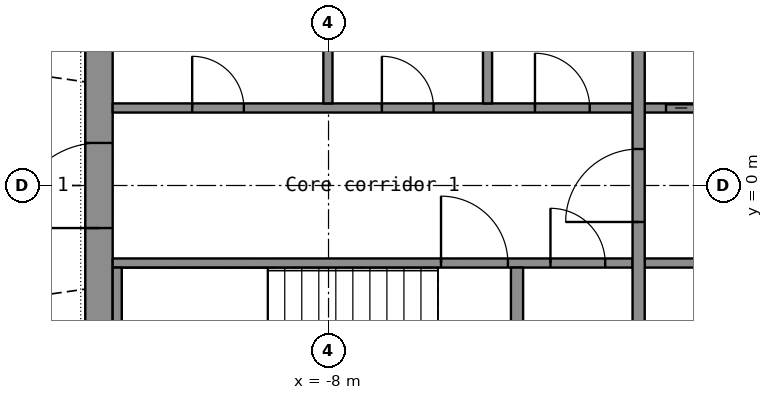
"""IFC4 building model, lengths in metres.
Left out: names, types, materials, properties, quantities, classifications, styles, units other than length and angle.
Written with IfcOpenShell. Run it as: python <this file> out.ifc"""

import sys

from ifc_helpers import new_model, si_unit, direction, frame, frame_2d, origin, place, context, subcontext, project, spatial, rectangle, extrude, element, fill, save


model = new_model("IFC4")
c1 = context("Model", 3, precision=1e-05, world=origin(), true_north=direction((0.0, 1.0)))
c2 = subcontext(c1, "Body", "Model", "MODEL_VIEW")
j1 = project(units=[si_unit("LENGTHUNIT", "METRE"), si_unit("PLANEANGLEUNIT", "RADIAN")], contexts=[c1])
p1 = place(None, origin())
s1 = spatial("IfcSite", under=j1, at=p1, CompositionType="ELEMENT")
p2 = place(p1, origin())
s2 = spatial("IfcBuilding", under=s1, at=p2, CompositionType="ELEMENT")
p3 = place(p2, frame((0.0, 0.0, 160.8)))
s3 = spatial("IfcBuildingStorey", under=s2, at=p3, CompositionType="ELEMENT", Elevation=160.8)
p4 = place(p3, frame((-11.775, -7.2, 0.0), z_axis=(0.0, 0.0, 1.0), x_axis=(0.0, 1.0, 0.0)))
e1 = element("IfcWall", 1, at=p4, inside=s3, PredefinedType="SHEAR", context=c2, shape_type="SweptSolid", body=[
    extrude(rectangle(XDim=14.4, YDim=0.45, at=frame_2d((7.2, 0.0))), origin(), (0.0, 0.0, 1.0), 3.3),
])
p5 = place(p4, frame((6.5, 0.0, 0.0)))
e2 = element("IfcOpeningElement", 2, at=p5, cuts=e1, PredefinedType="OPENING", context=c2, shape_type="SweptSolid", body=[
    extrude(rectangle(XDim=1.4, YDim=2.2, at=frame_2d((0.7, 1.1))), frame((0.0, 0.235, 0.0), z_axis=(0.0, -1.0, 0.0), x_axis=(1.0, 0.0, 0.0)), (0.0, 0.0, 1.0), 0.47),
])
p6 = place(p3, frame((-11.55, -1.275, 0.0), z_axis=(0.0, 0.0, 1.0), x_axis=(1.0, 0.0, 0.0)))
e3 = element("IfcWall", 3, at=p6, inside=s3, PredefinedType="SHEAR", context=c2, shape_type="SweptSolid", body=[
    extrude(rectangle(XDim=8.55, YDim=0.15, at=frame_2d((4.275, 0.0))), origin(), (0.0, 0.0, 1.0), 3.3),
])
p7 = place(p6, frame((5.4, 0.0, 0.0)))
e4 = element("IfcOpeningElement", 4, at=p7, cuts=e3, PredefinedType="OPENING", context=c2, shape_type="SweptSolid", body=[
    extrude(rectangle(XDim=1.1, YDim=2.15, at=frame_2d((0.55, 1.075))), frame((0.0, 0.085, 0.0), z_axis=(0.0, -1.0, 0.0), x_axis=(1.0, 0.0, 0.0)), (0.0, 0.0, 1.0), 0.17),
])
p8 = place(p6, frame((7.2, 0.0, 0.0)))
e5 = element("IfcOpeningElement", 5, at=p8, cuts=e3, PredefinedType="OPENING", context=c2, shape_type="SweptSolid", body=[
    extrude(rectangle(XDim=0.9, YDim=2.1, at=frame_2d((0.45, 1.05))), frame((0.0, 0.085, 0.0), z_axis=(0.0, -1.0, 0.0), x_axis=(1.0, 0.0, 0.0)), (0.0, 0.0, 1.0), 0.17),
])
p9 = place(p3, frame((-2.8, -1.275, 0.0), z_axis=(0.0, 0.0, 1.0), x_axis=(1.0, 0.0, 0.0)))
e6 = element("IfcWall", 6, at=p9, inside=s3, PredefinedType="SHEAR", context=c2, shape_type="SweptSolid", body=[
    extrude(rectangle(XDim=5.6, YDim=0.15, at=frame_2d((2.8, 0.0))), origin(), (0.0, 0.0, 1.0), 3.3),
])
p10 = place(p9, frame((4.15, 0.0, 0.0)))
e7 = element("IfcOpeningElement", 7, at=p10, cuts=e6, PredefinedType="OPENING", context=c2, shape_type="SweptSolid", body=[
    extrude(rectangle(XDim=1.1, YDim=2.2, at=frame_2d((0.55, 1.1))), frame((0.0, 0.085, 0.0), z_axis=(0.0, -1.0, 0.0), x_axis=(1.0, 0.0, 0.0)), (0.0, 0.0, 1.0), 0.17),
])
p11 = place(p9, frame((1.35, 0.0, 0.0)))
e8 = element("IfcOpeningElement", 8, at=p11, cuts=e6, PredefinedType="OPENING", context=c2, shape_type="SweptSolid", body=[
    extrude(rectangle(XDim=0.9, YDim=2.1, at=frame_2d((0.45, 1.05))), frame((0.0, 0.085, 0.0), z_axis=(0.0, -1.0, 0.0), x_axis=(1.0, 0.0, 0.0)), (0.0, 0.0, 1.0), 0.17),
])
p12 = place(p3, frame((-11.55, 1.275, 0.0), z_axis=(0.0, 0.0, 1.0), x_axis=(1.0, 0.0, 0.0)))
e9 = element("IfcWall", 9, at=p12, inside=s3, PredefinedType="PARTITIONING", context=c2, shape_type="SweptSolid", body=[
    extrude(rectangle(XDim=8.55, YDim=0.15, at=frame_2d((4.275, 0.0))), origin(), (0.0, 0.0, 1.0), 3.3),
])
p13 = place(p12, frame((1.308, 0.0, 0.0)))
e10 = element("IfcOpeningElement", 10, at=p13, cuts=e9, PredefinedType="OPENING", context=c2, shape_type="SweptSolid", body=[
    extrude(rectangle(XDim=0.85, YDim=2.1, at=frame_2d((0.425, 1.05))), frame((0.0, 0.085, 0.0), z_axis=(0.0, -1.0, 0.0), x_axis=(1.0, 0.0, 0.0)), (0.0, 0.0, 1.0), 0.17),
])
p14 = place(p12, frame((4.427, 0.0, 0.0)))
e11 = element("IfcOpeningElement", 11, at=p14, cuts=e9, PredefinedType="OPENING", context=c2, shape_type="SweptSolid", body=[
    extrude(rectangle(XDim=0.85, YDim=2.1, at=frame_2d((0.425, 1.05))), frame((0.0, 0.085, 0.0), z_axis=(0.0, -1.0, 0.0), x_axis=(1.0, 0.0, 0.0)), (0.0, 0.0, 1.0), 0.17),
])
p15 = place(p12, frame((6.945, 0.0, 0.0)))
e12 = element("IfcOpeningElement", 12, at=p15, cuts=e9, PredefinedType="OPENING", context=c2, shape_type="SweptSolid", body=[
    extrude(rectangle(XDim=0.9, YDim=2.1, at=frame_2d((0.45, 1.05))), frame((0.0, 0.085, 0.0), z_axis=(0.0, -1.0, 0.0), x_axis=(1.0, 0.0, 0.0)), (0.0, 0.0, 1.0), 0.17),
])
p16 = place(p3, frame((-2.8, 1.275, 0.0), z_axis=(0.0, 0.0, 1.0), x_axis=(1.0, 0.0, 0.0)))
e13 = element("IfcWall", 13, at=p16, inside=s3, PredefinedType="SHEAR", context=c2, shape_type="SweptSolid", body=[
    extrude(rectangle(XDim=5.6, YDim=0.15, at=frame_2d((2.8, 0.0))), origin(), (0.0, 0.0, 1.0), 3.3),
])
p17 = place(p16, frame((0.35, 0.0, 0.0)))
e14 = element("IfcOpeningElement", 14, at=p17, cuts=e13, PredefinedType="OPENING", context=c2, shape_type="SweptSolid", body=[
    extrude(rectangle(XDim=1.1, YDim=2.2, at=frame_2d((0.55, 1.1))), frame((0.0, 0.085, 0.0), z_axis=(0.0, -1.0, 0.0), x_axis=(1.0, 0.0, 0.0)), (0.0, 0.0, 1.0), 0.17),
])
p18 = place(p16, frame((3.35, 0.0, 0.0)))
e15 = element("IfcOpeningElement", 15, at=p18, cuts=e13, PredefinedType="OPENING", context=c2, shape_type="SweptSolid", body=[
    extrude(rectangle(XDim=0.9, YDim=2.1, at=frame_2d((0.45, 1.05))), frame((0.0, 0.085, 0.0), z_axis=(0.0, -1.0, 0.0), x_axis=(1.0, 0.0, 0.0)), (0.0, 0.0, 1.0), 0.17),
])
p19 = place(p3, frame((-2.9, -3.7, 0.0), z_axis=(0.0, 0.0, 1.0), x_axis=(0.0, 1.0, 0.0)))
e16 = element("IfcWall", 16, at=p19, inside=s3, PredefinedType="SHEAR", context=c2, shape_type="SweptSolid", body=[
    extrude(rectangle(XDim=7.4, YDim=0.2, at=frame_2d((3.7, 0.0))), origin(), (0.0, 0.0, 1.0), 3.3),
])
p20 = place(p19, frame((3.1, 0.0, 0.0)))
e17 = element("IfcOpeningElement", 17, at=p20, cuts=e16, PredefinedType="OPENING", context=c2, shape_type="SweptSolid", body=[
    extrude(rectangle(XDim=1.2, YDim=2.2, at=frame_2d((0.6, 1.1))), frame((0.0, 0.11, 0.0), z_axis=(0.0, -1.0, 0.0), x_axis=(1.0, 0.0, 0.0)), (0.0, 0.0, 1.0), 0.22),
])
p21 = place(p3, frame((-11.475, -3.7, 0.0), z_axis=(0.0, 0.0, 1.0), x_axis=(0.0, 1.0, 0.0)))
e18 = element("IfcWall", 18, at=p21, inside=s3, PredefinedType="SHEAR", context=c2, shape_type="SweptSolid", body=[
    extrude(rectangle(XDim=2.35, YDim=0.15, at=frame_2d((1.175, 0.0))), origin(), (0.0, 0.0, 1.0), 3.3),
])
p22 = place(p3, frame((-4.9, -3.7, 0.0), z_axis=(0.0, 0.0, 1.0), x_axis=(0.0, 1.0, 0.0)))
e19 = element("IfcWall", 19, at=p22, inside=s3, PredefinedType="SHEAR", context=c2, shape_type="SweptSolid", body=[
    extrude(rectangle(XDim=2.35, YDim=0.2, at=frame_2d((1.175, 0.0))), origin(), (0.0, 0.0, 1.0), 3.3),
])
for number, where, z_axis, x_axis in (
    (20, (-8.01, 1.35, 0.0), (0.0, 0.0, 1.0), (0.0, 1.0, 0.0)),
    (21, (-5.385, 1.35, 0.0), (0.0, 0.0, 1.0), (0.0, 1.0, 0.0)),
):
    element("IfcWall", number, at=place(p3, frame(where, z_axis=z_axis, x_axis=x_axis)), inside=s3, PredefinedType="PARTITIONING", context=c2, shape_type="SweptSolid", body=[
        extrude(rectangle(XDim=2.35, YDim=0.15, at=frame_2d((1.175, 0.0))), origin(), (0.0, 0.0, 1.0), 3.3),
    ])
p23 = place(p5, origin())
e22 = element("IfcDoor", 22, at=p23, inside=s3, OperationType="DOUBLE_DOOR_SINGLE_SWING", PredefinedType="DOOR", context=c2, shape_type="SweptSolid", body=[
    extrude(rectangle(XDim=1.4, YDim=2.2, at=frame_2d((0.7, 1.1))), frame((0.0, 0.025, 0.0), z_axis=(0.0, -1.0, 0.0), x_axis=(1.0, 0.0, 0.0)), (0.0, 0.0, 1.0), 0.05),
])
fill(e2, e22)
p24 = place(p20, origin())
e23 = element("IfcDoor", 23, at=p24, inside=s3, OperationType="SINGLE_SWING_LEFT", PredefinedType="DOOR", context=c2, shape_type="SweptSolid", body=[
    extrude(rectangle(XDim=1.2, YDim=2.2, at=frame_2d((0.6, 1.1))), frame((0.0, 0.025, 0.0), z_axis=(0.0, -1.0, 0.0), x_axis=(1.0, 0.0, 0.0)), (0.0, 0.0, 1.0), 0.05),
])
fill(e17, e23)
p25 = place(p17, origin())
e24 = element("IfcDoor", 24, at=p25, inside=s3, OperationType="DOUBLE_DOOR_SLIDING", PredefinedType="DOOR", context=c2, shape_type="SweptSolid", body=[
    extrude(rectangle(XDim=1.1, YDim=2.2, at=frame_2d((0.55, 1.1))), frame((0.0, 0.025, 0.0), z_axis=(0.0, -1.0, 0.0), x_axis=(1.0, 0.0, 0.0)), (0.0, 0.0, 1.0), 0.05),
])
fill(e14, e24)
p26 = place(p7, origin())
e25 = element("IfcDoor", 25, at=p26, inside=s3, OperationType="SINGLE_SWING_LEFT", PredefinedType="DOOR", context=c2, shape_type="SweptSolid", body=[
    extrude(rectangle(XDim=1.1, YDim=2.15, at=frame_2d((0.55, 1.075))), frame((0.0, 0.025, 0.0), z_axis=(0.0, -1.0, 0.0), x_axis=(1.0, 0.0, 0.0)), (0.0, 0.0, 1.0), 0.05),
])
fill(e4, e25)
p27 = place(p13, origin())
e26 = element("IfcDoor", 26, at=p27, inside=s3, OperationType="SINGLE_SWING_LEFT", PredefinedType="DOOR", context=c2, shape_type="SweptSolid", body=[
    extrude(rectangle(XDim=0.85, YDim=2.1, at=frame_2d((0.425, 1.05))), frame((0.0, 0.025, 0.0), z_axis=(0.0, -1.0, 0.0), x_axis=(1.0, 0.0, 0.0)), (0.0, 0.0, 1.0), 0.05),
])
fill(e10, e26)
p28 = place(p14, origin())
e27 = element("IfcDoor", 27, at=p28, inside=s3, OperationType="SINGLE_SWING_LEFT", PredefinedType="DOOR", context=c2, shape_type="SweptSolid", body=[
    extrude(rectangle(XDim=0.85, YDim=2.1, at=frame_2d((0.425, 1.05))), frame((0.0, 0.025, 0.0), z_axis=(0.0, -1.0, 0.0), x_axis=(1.0, 0.0, 0.0)), (0.0, 0.0, 1.0), 0.05),
])
fill(e11, e27)
p29 = place(p15, origin())
e28 = element("IfcDoor", 28, at=p29, inside=s3, OperationType="SINGLE_SWING_LEFT", PredefinedType="DOOR", context=c2, shape_type="SweptSolid", body=[
    extrude(rectangle(XDim=0.9, YDim=2.1, at=frame_2d((0.45, 1.05))), frame((0.0, 0.025, 0.0), z_axis=(0.0, -1.0, 0.0), x_axis=(1.0, 0.0, 0.0)), (0.0, 0.0, 1.0), 0.05),
])
fill(e12, e28)
p30 = place(p8, origin())
e29 = element("IfcDoor", 29, at=p30, inside=s3, OperationType="SINGLE_SWING_LEFT", PredefinedType="DOOR", context=c2, shape_type="SweptSolid", body=[
    extrude(rectangle(XDim=0.9, YDim=2.1, at=frame_2d((0.45, 1.05))), frame((0.0, 0.025, 0.0), z_axis=(0.0, -1.0, 0.0), x_axis=(1.0, 0.0, 0.0)), (0.0, 0.0, 1.0), 0.05),
])
fill(e5, e29)
save(model, sys.argv[1])
